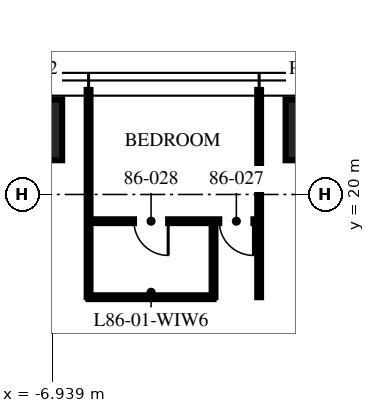
"""IFC4 building model, lengths in metres.
Left out: names, types, materials, properties, quantities, classifications, styles, units other than length and angle.
Written with IfcOpenShell. Run it as: python <this file> out.ifc"""

import sys

from ifc_helpers import new_model, si_unit, direction, frame, frame_2d, origin, origin_2d, place, context, subcontext, project, spatial, rectangle, extrude, element, fill, save


model = new_model("IFC4")
c1 = context("Model", 3, precision=1e-05, world=origin(), true_north=direction((0.0, 1.0)))
c2 = subcontext(c1, "Body", "Model", "MODEL_VIEW")
j1 = project(units=[si_unit("LENGTHUNIT", "METRE"), si_unit("PLANEANGLEUNIT", "RADIAN")], contexts=[c1])
p1 = place(None, origin())
s1 = spatial("IfcSite", under=j1, at=p1, CompositionType="ELEMENT")
p2 = place(p1, origin())
s2 = spatial("IfcBuilding", under=s1, at=p2, CompositionType="ELEMENT")
p3 = place(p2, frame((0.0, 0.0, 342.0)))
s3 = spatial("IfcBuildingStorey", under=s2, at=p3, CompositionType="ELEMENT", Elevation=342.0)
for number, where, z_axis, x_axis in (
    (1, (-7.48, 21.7, 0.0), (0.0, 0.0, 1.0), (1.0, 0.0, 0.0)),
    (2, (0.0, 21.7, 0.0), (0.0, 0.0, 1.0), (1.0, 0.0, 0.0)),
):
    element("IfcColumn", number, at=place(p3, frame(where, z_axis=z_axis, x_axis=x_axis)), inside=s3, PredefinedType="COLUMN", context=c2, shape_type="SweptSolid", body=[
        extrude(rectangle(XDim=1.6, YDim=1.6, at=origin_2d()), origin(), (0.0, 0.0, 1.0), 3.75),
    ])
for number, where, z_axis, x_axis in (
    (3, (-1.496, 17.296, 0.0), (0.0, 0.0, 1.0), (0.0, 1.0, 0.0)),
    (4, (-5.984, 17.296, 0.0), (0.0, 0.0, 1.0), (0.0, 1.0, 0.0)),
):
    element("IfcWall", number, at=place(p3, frame(where, z_axis=z_axis, x_axis=x_axis)), inside=s3, PredefinedType="PARTITIONING", context=c2, shape_type="SweptSolid", body=[
        extrude(rectangle(XDim=5.454, YDim=0.1, at=frame_2d((2.727, 0.0))), origin(), (0.0, 0.0, 1.0), 3.01),
    ])
p4 = place(p3, frame((-1.496, 19.296, 0.0), z_axis=(0.0, 0.0, 1.0), x_axis=(-1.0, 0.0, 0.0)))
e5 = element("IfcWall", 5, at=p4, inside=s3, PredefinedType="PARTITIONING", context=c2, shape_type="SweptSolid", body=[
    extrude(rectangle(XDim=4.488, YDim=0.1, at=frame_2d((2.244, 0.0))), origin(), (0.0, 0.0, 1.0), 2.91),
])
p5 = place(p4, frame((0.15, 0.0, 0.0)))
e6 = element("IfcOpeningElement", 6, at=p5, cuts=e5, PredefinedType="OPENING", context=c2, shape_type="SweptSolid", body=[
    extrude(rectangle(XDim=0.9, YDim=2.1, at=frame_2d((0.45, 1.05))), frame((0.0, 0.06, 0.0), z_axis=(0.0, -1.0, 0.0), x_axis=(1.0, 0.0, 0.0)), (0.0, 0.0, 1.0), 0.12),
])
p6 = place(p4, frame((2.394, 0.0, 0.0)))
e7 = element("IfcOpeningElement", 7, at=p6, cuts=e5, PredefinedType="OPENING", context=c2, shape_type="SweptSolid", body=[
    extrude(rectangle(XDim=0.9, YDim=2.1, at=frame_2d((0.45, 1.05))), frame((0.0, 0.06, 0.0), z_axis=(0.0, -1.0, 0.0), x_axis=(1.0, 0.0, 0.0)), (0.0, 0.0, 1.0), 0.12),
])
p7 = place(p3, frame((-2.696, 17.296, 0.0), z_axis=(0.0, 0.0, 1.0), x_axis=(0.0, 1.0, 0.0)))
e8 = element("IfcWall", 8, at=p7, inside=s3, PredefinedType="PARTITIONING", context=c2, shape_type="SweptSolid", body=[
    extrude(rectangle(XDim=2.0, YDim=0.1, at=frame_2d((1.0, 0.0))), origin(), (0.0, 0.0, 1.0), 3.5),
])
p8 = place(p3, frame((-2.696, 17.296, 0.0), z_axis=(0.0, 0.0, 1.0), x_axis=(-1.0, 0.0, 0.0)))
e9 = element("IfcWall", 9, at=p8, inside=s3, PredefinedType="PARTITIONING", context=c2, shape_type="SweptSolid", body=[
    extrude(rectangle(XDim=3.288, YDim=0.1, at=frame_2d((1.644, 0.0))), origin(), (0.0, 0.0, 1.0), 2.91),
])
p9 = place(p5, origin())
e10 = element("IfcDoor", 10, at=p9, inside=s3, OperationType="SINGLE_SWING_LEFT", PredefinedType="DOOR", context=c2, shape_type="SweptSolid", body=[
    extrude(rectangle(XDim=0.9, YDim=2.1, at=frame_2d((0.45, 1.05))), frame((0.0, 0.025, 0.0), z_axis=(0.0, -1.0, 0.0), x_axis=(1.0, 0.0, 0.0)), (0.0, 0.0, 1.0), 0.05),
])
fill(e6, e10)
p10 = place(p6, origin())
e11 = element("IfcDoor", 11, at=p10, inside=s3, OperationType="SINGLE_SWING_LEFT", PredefinedType="DOOR", context=c2, shape_type="SweptSolid", body=[
    extrude(rectangle(XDim=0.9, YDim=2.1, at=frame_2d((0.45, 1.05))), frame((0.0, 0.025, 0.0), z_axis=(0.0, -1.0, 0.0), x_axis=(1.0, 0.0, 0.0)), (0.0, 0.0, 1.0), 0.05),
])
fill(e7, e11)
save(model, sys.argv[1])
